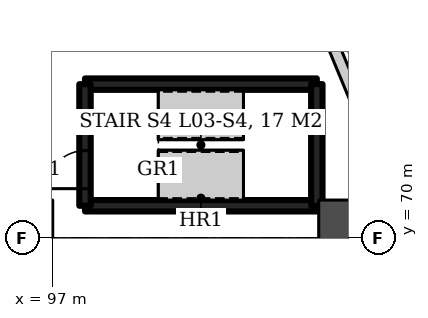
"""IFC4 building model, lengths in metres.
Left out: names, types, materials, properties, quantities, classifications, styles, units other than length and angle.
Written with IfcOpenShell. Run it as: python <this file> out.ifc"""

import sys

from ifc_helpers import new_model, si_unit, direction, frame, frame_2d, origin, origin_2d, place, context, subcontext, project, spatial, rectangle, extrude, element, fill, save


model = new_model("IFC4")
c1 = context("Model", 3, precision=1e-05, world=origin(), true_north=direction((0.0, 1.0)))
c2 = subcontext(c1, "Body", "Model", "MODEL_VIEW")
j1 = project(units=[si_unit("LENGTHUNIT", "METRE"), si_unit("PLANEANGLEUNIT", "RADIAN")], contexts=[c1])
p1 = place(None, origin())
s1 = spatial("IfcSite", under=j1, at=p1, CompositionType="ELEMENT")
p2 = place(p1, origin())
s2 = spatial("IfcBuilding", under=s1, at=p2, CompositionType="ELEMENT")
p3 = place(p2, frame((0.0, 0.0, 20.0)))
s3 = spatial("IfcBuildingStorey", under=s2, at=p3, CompositionType="ELEMENT", Elevation=20.0)
p4 = place(p3, frame((105.0, 70.0, 0.0), z_axis=(0.0, 0.0, 1.0), x_axis=(1.0, 0.0, 0.0)))
e1 = element("IfcColumn", 1, at=p4, inside=s3, PredefinedType="COLUMN", context=c2, shape_type="SweptSolid", body=[
    extrude(rectangle(XDim=2.0, YDim=2.0, at=origin_2d()), origin(), (0.0, 0.0, 1.0), 6.0),
])
p5 = place(p3, frame((105.335, 72.769, 0.0), z_axis=(0.0, 0.0, 1.0), x_axis=(-0.382709424419, 0.923868765822, 0.0)))
e2 = element("IfcWall", 2, at=p5, inside=s3, PredefinedType="SOLIDWALL", context=c2, shape_type="SweptSolid", body=[
    extrude(rectangle(XDim=2.793, YDim=0.3, at=frame_2d((1.397, 0.0))), origin(), (0.0, 0.0, 1.0), 5.7),
])
for number, where, z_axis, x_axis in (
    (3, (97.85, 70.85, 0.0), (0.0, 0.0, 1.0), (1.0, 0.0, 0.0)),
    (4, (97.85, 74.05, 0.0), (0.0, 0.0, 1.0), (1.0, 0.0, 0.0)),
):
    element("IfcWall", number, at=place(p3, frame(where, z_axis=z_axis, x_axis=x_axis)), inside=s3, PredefinedType="SHEAR", context=c2, shape_type="SweptSolid", body=[
        extrude(rectangle(XDim=6.1, YDim=0.3, at=frame_2d((3.05, 0.0))), origin(), (0.0, 0.0, 1.0), 6.0),
    ])
p6 = place(p3, frame((97.85, 70.85, 0.0), z_axis=(0.0, 0.0, 1.0), x_axis=(0.0, 1.0, 0.0)))
e5 = element("IfcWall", 5, at=p6, inside=s3, PredefinedType="SHEAR", context=c2, shape_type="SweptSolid", body=[
    extrude(rectangle(XDim=3.2, YDim=0.3, at=frame_2d((1.6, 0.0))), origin(), (0.0, 0.0, 1.0), 6.0),
])
p7 = place(p6, frame((0.45, 0.0, 0.0)))
e6 = element("IfcOpeningElement", 6, at=p7, cuts=e5, PredefinedType="OPENING", context=c2, shape_type="SweptSolid", body=[
    extrude(rectangle(XDim=1.0, YDim=2.1, at=frame_2d((0.5, 1.05))), frame((0.0, 0.16, 0.0), z_axis=(0.0, -1.0, 0.0), x_axis=(1.0, 0.0, 0.0)), (0.0, 0.0, 1.0), 0.32),
])
p8 = place(p3, frame((103.95, 70.85, 0.0), z_axis=(0.0, 0.0, 1.0), x_axis=(0.0, 1.0, 0.0)))
e7 = element("IfcWall", 7, at=p8, inside=s3, PredefinedType="SHEAR", context=c2, shape_type="SweptSolid", body=[
    extrude(rectangle(XDim=3.2, YDim=0.3, at=frame_2d((1.6, 0.0))), origin(), (0.0, 0.0, 1.0), 6.0),
])
p9 = place(p7, origin())
e8 = element("IfcDoor", 8, at=p9, inside=s3, OperationType="SINGLE_SWING_LEFT", PredefinedType="DOOR", context=c2, shape_type="SweptSolid", body=[
    extrude(rectangle(XDim=1.0, YDim=2.1, at=frame_2d((0.5, 1.05))), frame((0.0, 0.025, 0.0), z_axis=(0.0, -1.0, 0.0), x_axis=(1.0, 0.0, 0.0)), (0.0, 0.0, 1.0), 0.05),
])
fill(e6, e8)
save(model, sys.argv[1])
